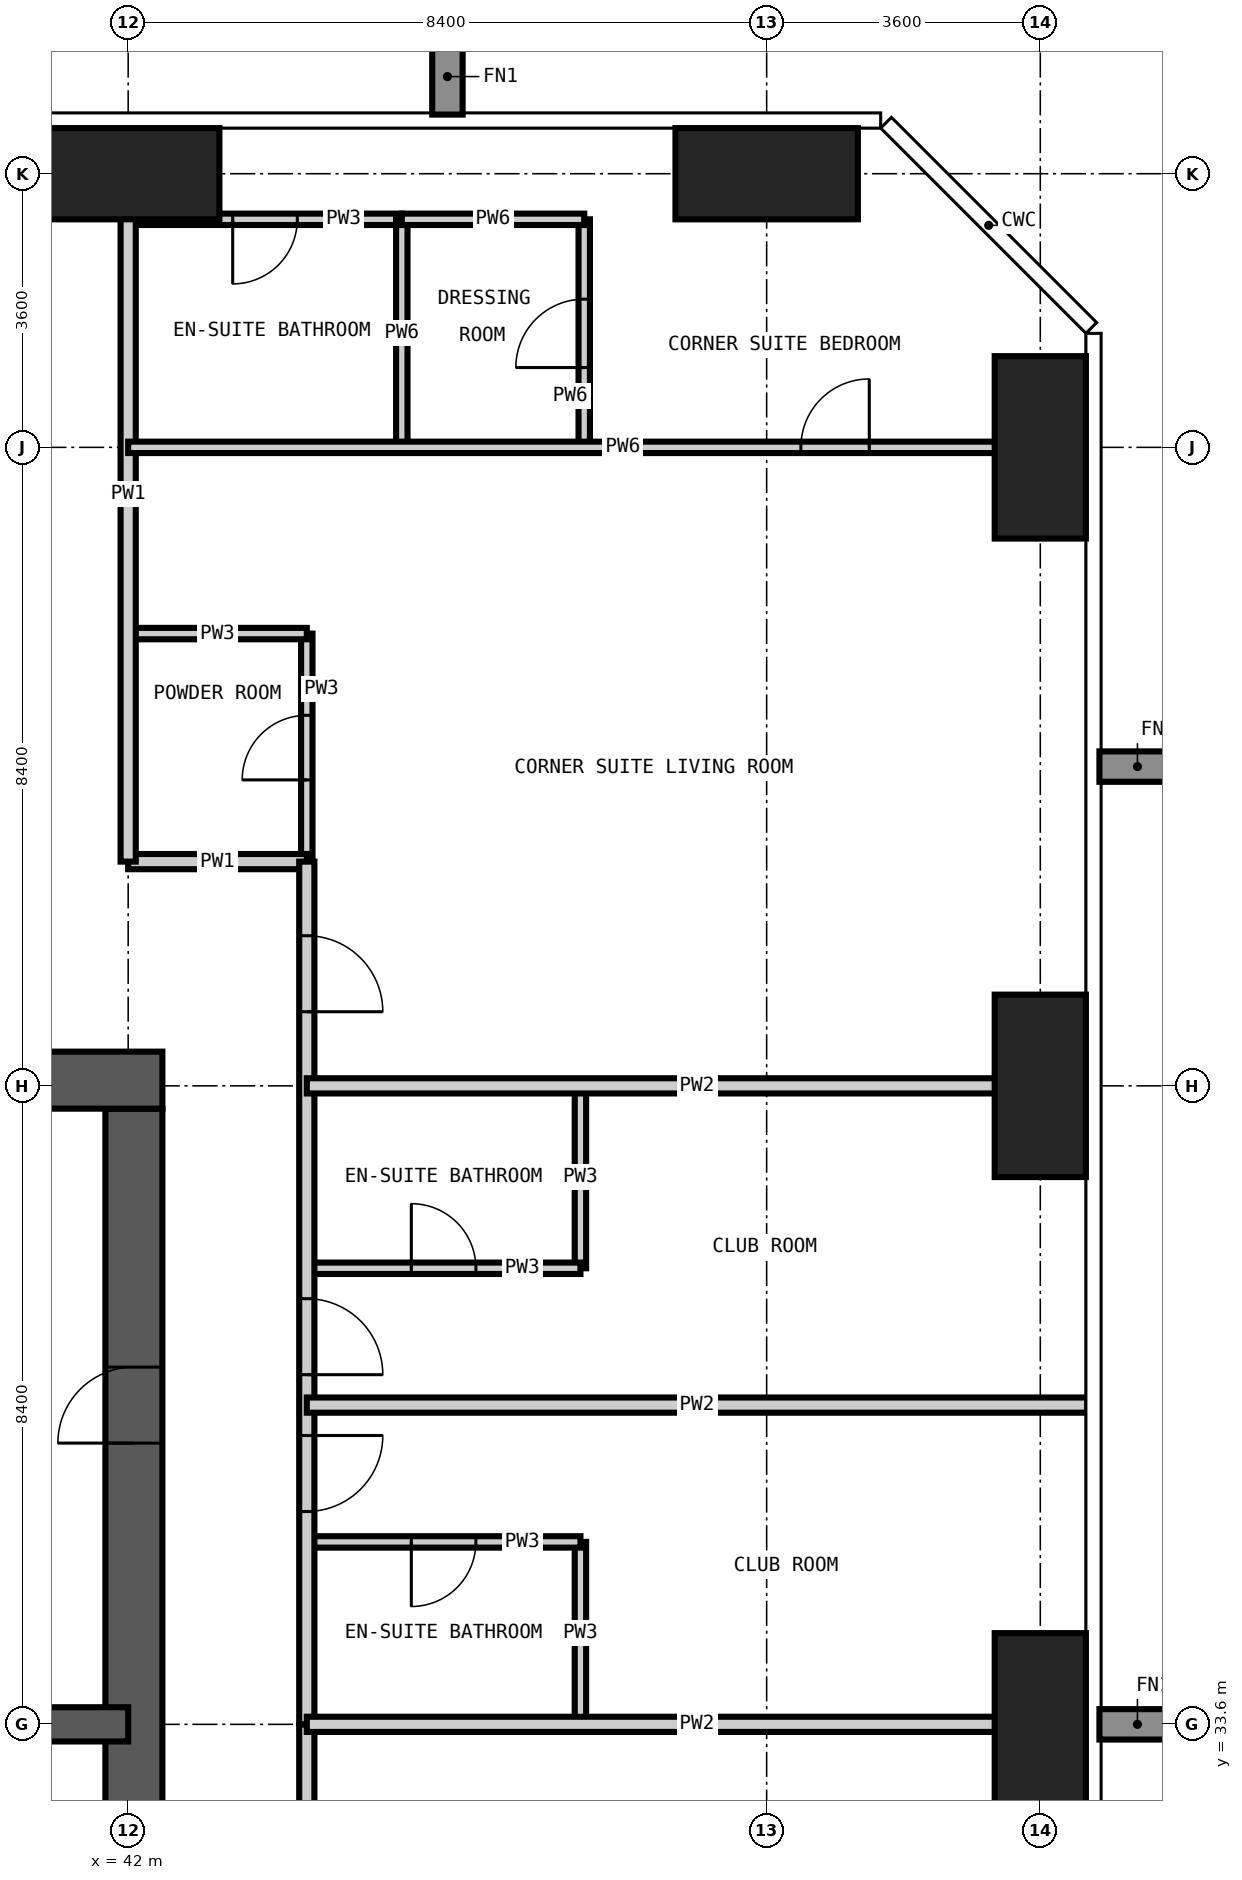
"""IFC4 building model, lengths in metres.
Left out: names, types, materials, properties, quantities, classifications, styles, units other than length and angle.
Written with IfcOpenShell. Run it as: python <this file> out.ifc"""

import sys

from ifc_helpers import new_model, si_unit, direction, frame, frame_2d, origin, origin_2d, place, context, subcontext, project, spatial, rectangle, extrude, element, fill, save


model = new_model("IFC4")
c1 = context("Model", 3, precision=1e-05, world=origin(), true_north=direction((0.0, 1.0)))
c2 = subcontext(c1, "Body", "Model", "MODEL_VIEW")
j1 = project(units=[si_unit("LENGTHUNIT", "METRE"), si_unit("PLANEANGLEUNIT", "RADIAN")], contexts=[c1])
p1 = place(None, origin())
s1 = spatial("IfcSite", under=j1, at=p1, CompositionType="ELEMENT")
p2 = place(p1, origin())
s2 = spatial("IfcBuilding", under=s1, at=p2, CompositionType="ELEMENT")
p3 = place(p2, frame((0.0, 0.0, 166.2)))
s3 = spatial("IfcBuildingStorey", under=s2, at=p3, CompositionType="ELEMENT", Elevation=166.2)
for number, where, z_axis, x_axis in (
    (1, (42.0, 54.0, -0.35), (0.0, 0.0, 1.0), (1.0, 0.0, 0.0)),
    (2, (50.4, 54.0, -0.35), (0.0, 0.0, 1.0), (1.0, 0.0, 0.0)),
):
    element("IfcColumn", number, at=place(p3, frame(where, z_axis=z_axis, x_axis=x_axis)), inside=s3, PredefinedType="COLUMN", context=c2, shape_type="SweptSolid", body=[
        extrude(rectangle(XDim=2.4, YDim=1.2, at=origin_2d()), origin(), (0.0, 0.0, 1.0), 3.6),
    ])
for number, where, z_axis, x_axis in (
    (3, (54.0, 33.6, -0.35), (0.0, 0.0, 1.0), (1.0, 0.0, 0.0)),
    (4, (54.0, 42.0, -0.35), (0.0, 0.0, 1.0), (1.0, 0.0, 0.0)),
    (5, (54.0, 50.4, -0.35), (0.0, 0.0, 1.0), (1.0, 0.0, 0.0)),
):
    element("IfcColumn", number, at=place(p3, frame(where, z_axis=z_axis, x_axis=x_axis)), inside=s3, PredefinedType="COLUMN", context=c2, shape_type="SweptSolid", body=[
        extrude(rectangle(XDim=1.2, YDim=2.4, at=origin_2d()), origin(), (0.0, 0.0, 1.0), 3.6),
    ])
p4 = place(p3, frame((42.075, 17.1, -0.35), z_axis=(0.0, 0.0, 1.0), x_axis=(0.0, 1.0, 0.0)))
e6 = element("IfcWall", 6, at=p4, inside=s3, PredefinedType="SHEAR", context=c2, shape_type="SweptSolid", body=[
    extrude(rectangle(XDim=24.6, YDim=0.75, at=frame_2d((12.3, 0.0))), origin(), (0.0, 0.0, 1.0), 3.6),
])
p5 = place(p4, frame((0.5, 0.0, 0.35)))
e7 = element("IfcOpeningElement", 7, at=p5, cuts=e6, PredefinedType="OPENING", context=c2, shape_type="SweptSolid", body=[
    extrude(rectangle(XDim=1.2, YDim=2.2, at=frame_2d((0.6, 1.1))), frame((0.0, 0.385, 0.0), z_axis=(0.0, -1.0, 0.0), x_axis=(1.0, 0.0, 0.0)), (0.0, 0.0, 1.0), 0.77),
])
p6 = place(p4, frame((11.8, 0.0, 0.35)))
e8 = element("IfcOpeningElement", 8, at=p6, cuts=e6, PredefinedType="OPENING", context=c2, shape_type="SweptSolid", body=[
    extrude(rectangle(XDim=1.0, YDim=2.1, at=frame_2d((0.5, 1.05))), frame((0.0, 0.385, 0.0), z_axis=(0.0, -1.0, 0.0), x_axis=(1.0, 0.0, 0.0)), (0.0, 0.0, 1.0), 0.77),
])
p7 = place(p4, frame((20.2, 0.0, 0.35)))
e9 = element("IfcOpeningElement", 9, at=p7, cuts=e6, PredefinedType="OPENING", context=c2, shape_type="SweptSolid", body=[
    extrude(rectangle(XDim=1.0, YDim=2.1, at=frame_2d((0.5, 1.05))), frame((0.0, 0.385, 0.0), z_axis=(0.0, -1.0, 0.0), x_axis=(1.0, 0.0, 0.0)), (0.0, 0.0, 1.0), 0.77),
])
p8 = place(p3, frame((42.45, 42.075, -0.35), z_axis=(0.0, 0.0, 1.0), x_axis=(-1.0, 0.0, 0.0)))
e10 = element("IfcWall", 10, at=p8, inside=s3, PredefinedType="SHEAR", context=c2, shape_type="SweptSolid", body=[
    extrude(rectangle(XDim=26.1, YDim=0.75, at=frame_2d((13.05, 0.0))), origin(), (0.0, 0.0, 1.0), 3.6),
])
p9 = place(p8, frame((20.95, 0.0, 0.35)))
e11 = element("IfcOpeningElement", 11, at=p9, cuts=e10, PredefinedType="OPENING", context=c2, shape_type="SweptSolid", body=[
    extrude(rectangle(XDim=1.0, YDim=2.1, at=frame_2d((0.5, 1.05))), frame((0.0, 0.385, 0.0), z_axis=(0.0, -1.0, 0.0), x_axis=(1.0, 0.0, 0.0)), (0.0, 0.0, 1.0), 0.77),
])
p10 = place(p8, frame((10.35, 0.0, 0.35)))
e12 = element("IfcOpeningElement", 12, at=p10, cuts=e10, PredefinedType="OPENING", context=c2, shape_type="SweptSolid", body=[
    extrude(rectangle(XDim=1.2, YDim=2.2, at=frame_2d((0.6, 1.1))), frame((0.0, 0.385, 0.0), z_axis=(0.0, -1.0, 0.0), x_axis=(1.0, 0.0, 0.0)), (0.0, 0.0, 1.0), 0.77),
])
p11 = place(p3, frame((16.8, 33.6, -0.35), z_axis=(0.0, 0.0, 1.0), x_axis=(1.0, 0.0, 0.0)))
e13 = element("IfcWall", 13, at=p11, inside=s3, PredefinedType="SHEAR", context=c2, shape_type="SweptSolid", body=[
    extrude(rectangle(XDim=25.2, YDim=0.45, at=frame_2d((12.6, 0.0))), origin(), (0.0, 0.0, 1.0), 3.6),
])
p12 = place(p3, frame((44.35, 44.95, 0.0), z_axis=(0.0, 0.0, 1.0), x_axis=(0.0, 1.0, 0.0)))
e14 = element("IfcWall", 14, at=p12, inside=s3, PredefinedType="PARTITIONING", context=c2, shape_type="SweptSolid", body=[
    extrude(rectangle(XDim=3.0, YDim=0.15, at=frame_2d((1.5, 0.0))), origin(), (0.0, 0.0, 1.0), 3.25),
])
p13 = place(p12, frame((1.075, 0.0, 0.0)))
e15 = element("IfcOpeningElement", 15, at=p13, cuts=e14, PredefinedType="OPENING", context=c2, shape_type="SweptSolid", body=[
    extrude(rectangle(XDim=0.85, YDim=2.1, at=frame_2d((0.425, 1.05))), frame((0.0, 0.085, 0.0), z_axis=(0.0, -1.0, 0.0), x_axis=(1.0, 0.0, 0.0)), (0.0, 0.0, 1.0), 0.17),
])
for number, where, z_axis, x_axis in (
    (16, (47.95, 33.6, 0.0), (0.0, 0.0, 1.0), (0.0, 1.0, 0.0)),
    (17, (47.95, 39.6, 0.0), (0.0, 0.0, 1.0), (0.0, 1.0, 0.0)),
):
    element("IfcWall", number, at=place(p3, frame(where, z_axis=z_axis, x_axis=x_axis)), inside=s3, PredefinedType="PARTITIONING", context=c2, shape_type="SweptSolid", body=[
        extrude(rectangle(XDim=2.4, YDim=0.15, at=frame_2d((1.2, 0.0))), origin(), (0.0, 0.0, 1.0), 3.25),
    ])
p14 = place(p3, frame((44.35, 36.0, 0.0), z_axis=(0.0, 0.0, 1.0), x_axis=(1.0, 0.0, 0.0)))
e18 = element("IfcWall", 18, at=p14, inside=s3, PredefinedType="PARTITIONING", context=c2, shape_type="SweptSolid", body=[
    extrude(rectangle(XDim=3.6, YDim=0.15, at=frame_2d((1.8, 0.0))), origin(), (0.0, 0.0, 1.0), 3.25),
])
p15 = place(p14, frame((1.375, 0.0, 0.0)))
e19 = element("IfcOpeningElement", 19, at=p15, cuts=e18, PredefinedType="OPENING", context=c2, shape_type="SweptSolid", body=[
    extrude(rectangle(XDim=0.85, YDim=2.1, at=frame_2d((0.425, 1.05))), frame((0.0, 0.085, 0.0), z_axis=(0.0, -1.0, 0.0), x_axis=(1.0, 0.0, 0.0)), (0.0, 0.0, 1.0), 0.17),
])
p16 = place(p3, frame((44.35, 39.6, 0.0), z_axis=(0.0, 0.0, 1.0), x_axis=(1.0, 0.0, 0.0)))
e20 = element("IfcWall", 20, at=p16, inside=s3, PredefinedType="PARTITIONING", context=c2, shape_type="SweptSolid", body=[
    extrude(rectangle(XDim=3.6, YDim=0.15, at=frame_2d((1.8, 0.0))), origin(), (0.0, 0.0, 1.0), 3.25),
])
p17 = place(p16, frame((1.375, 0.0, 0.0)))
e21 = element("IfcOpeningElement", 21, at=p17, cuts=e20, PredefinedType="OPENING", context=c2, shape_type="SweptSolid", body=[
    extrude(rectangle(XDim=0.85, YDim=2.1, at=frame_2d((0.425, 1.05))), frame((0.0, 0.085, 0.0), z_axis=(0.0, -1.0, 0.0), x_axis=(1.0, 0.0, 0.0)), (0.0, 0.0, 1.0), 0.17),
])
p18 = place(p3, frame((42.0, 47.95, 0.0), z_axis=(0.0, 0.0, 1.0), x_axis=(1.0, 0.0, 0.0)))
e22 = element("IfcWall", 22, at=p18, inside=s3, PredefinedType="PARTITIONING", context=c2, shape_type="SweptSolid", body=[
    extrude(rectangle(XDim=2.35, YDim=0.15, at=frame_2d((1.175, 0.0))), origin(), (0.0, 0.0, 1.0), 3.25),
])
p19 = place(p3, frame((42.0, 53.4, 0.0), z_axis=(0.0, 0.0, 1.0), x_axis=(1.0, 0.0, 0.0)))
e23 = element("IfcWall", 23, at=p19, inside=s3, PredefinedType="PARTITIONING", context=c2, shape_type="SweptSolid", body=[
    extrude(rectangle(XDim=3.6, YDim=0.15, at=frame_2d((1.8, 0.0))), origin(), (0.0, 0.0, 1.0), 3.25),
])
p20 = place(p19, frame((1.375, 0.0, 0.0)))
e24 = element("IfcOpeningElement", 24, at=p20, cuts=e23, PredefinedType="OPENING", context=c2, shape_type="SweptSolid", body=[
    extrude(rectangle(XDim=0.85, YDim=2.1, at=frame_2d((0.425, 1.05))), frame((0.0, 0.085, 0.0), z_axis=(0.0, -1.0, 0.0), x_axis=(1.0, 0.0, 0.0)), (0.0, 0.0, 1.0), 0.17),
])
p21 = place(p3, frame((44.35, 25.2, 0.0), z_axis=(0.0, 0.0, 1.0), x_axis=(0.0, 1.0, 0.0)))
e25 = element("IfcWall", 25, at=p21, inside=s3, PredefinedType="PARTITIONING", context=c2, shape_type="SweptSolid", body=[
    extrude(rectangle(XDim=8.4, YDim=0.2, at=frame_2d((4.2, 0.0))), origin(), (0.0, 0.0, 1.0), 3.25),
])
p22 = place(p21, frame((3.3, 0.0, 0.0)))
e26 = element("IfcOpeningElement", 26, at=p22, cuts=e25, PredefinedType="OPENING", context=c2, shape_type="SweptSolid", body=[
    extrude(rectangle(XDim=1.8, YDim=2.4, at=frame_2d((0.9, 1.2))), frame((0.0, 0.11, 0.0), z_axis=(0.0, -1.0, 0.0), x_axis=(1.0, 0.0, 0.0)), (0.0, 0.0, 1.0), 0.22),
])
p23 = place(p3, frame((42.0, 44.95, 0.0), z_axis=(0.0, 0.0, 1.0), x_axis=(1.0, 0.0, 0.0)))
e27 = element("IfcWall", 27, at=p23, inside=s3, PredefinedType="PARTITIONING", context=c2, shape_type="SweptSolid", body=[
    extrude(rectangle(XDim=2.35, YDim=0.2, at=frame_2d((1.175, 0.0))), origin(), (0.0, 0.0, 1.0), 3.25),
])
p24 = place(p3, frame((42.0, 54.618, 0.0), z_axis=(0.0, 0.0, 1.0), x_axis=(0.0, -1.0, 0.0)))
e28 = element("IfcWall", 28, at=p24, inside=s3, PredefinedType="PARTITIONING", context=c2, shape_type="SweptSolid", body=[
    extrude(rectangle(XDim=9.668, YDim=0.2, at=frame_2d((4.834, 0.0))), origin(), (0.0, 0.0, 1.0), 3.25),
])
p25 = place(p3, frame((44.35, 44.95, 0.0), z_axis=(0.0, 0.0, 1.0), x_axis=(0.0, -1.0, 0.0)))
e29 = element("IfcWall", 29, at=p25, inside=s3, PredefinedType="PARTITIONING", context=c2, shape_type="SweptSolid", body=[
    extrude(rectangle(XDim=11.35, YDim=0.2, at=frame_2d((5.675, 0.0))), origin(), (0.0, 0.0, 1.0), 3.25),
])
p26 = place(p25, frame((7.55, 0.0, 0.0)))
e30 = element("IfcOpeningElement", 30, at=p26, cuts=e29, PredefinedType="OPENING", context=c2, shape_type="SweptSolid", body=[
    extrude(rectangle(XDim=1.0, YDim=2.2, at=frame_2d((0.5, 1.1))), frame((0.0, 0.11, 0.0), z_axis=(0.0, -1.0, 0.0), x_axis=(1.0, 0.0, 0.0)), (0.0, 0.0, 1.0), 0.22),
])
p27 = place(p25, frame((5.75, 0.0, 0.0)))
e31 = element("IfcOpeningElement", 31, at=p27, cuts=e29, PredefinedType="OPENING", context=c2, shape_type="SweptSolid", body=[
    extrude(rectangle(XDim=1.0, YDim=2.2, at=frame_2d((0.5, 1.1))), frame((0.0, 0.11, 0.0), z_axis=(0.0, -1.0, 0.0), x_axis=(1.0, 0.0, 0.0)), (0.0, 0.0, 1.0), 0.22),
])
p28 = place(p25, frame((0.975, 0.0, 0.0)))
e32 = element("IfcOpeningElement", 32, at=p28, cuts=e29, PredefinedType="OPENING", context=c2, shape_type="SweptSolid", body=[
    extrude(rectangle(XDim=1.0, YDim=2.2, at=frame_2d((0.5, 1.1))), frame((0.0, 0.11, 0.0), z_axis=(0.0, -1.0, 0.0), x_axis=(1.0, 0.0, 0.0)), (0.0, 0.0, 1.0), 0.22),
])
for number, where, z_axis, x_axis in (
    (33, (44.35, 33.6, 0.0), (0.0, 0.0, 1.0), (1.0, 0.0, 0.0)),
    (34, (44.35, 37.8, 0.0), (0.0, 0.0, 1.0), (1.0, 0.0, 0.0)),
    (35, (44.35, 42.0, 0.0), (0.0, 0.0, 1.0), (1.0, 0.0, 0.0)),
):
    element("IfcWall", number, at=place(p3, frame(where, z_axis=z_axis, x_axis=x_axis)), inside=s3, PredefinedType="PARTITIONING", context=c2, shape_type="SweptSolid", body=[
        extrude(rectangle(XDim=10.268, YDim=0.2, at=frame_2d((5.134, 0.0))), origin(), (0.0, 0.0, 1.0), 3.25),
    ])
p29 = place(p3, frame((45.6, 50.4, 0.0), z_axis=(0.0, 0.0, 1.0), x_axis=(0.0, 1.0, 0.0)))
e36 = element("IfcWall", 36, at=p29, inside=s3, PredefinedType="PARTITIONING", context=c2, shape_type="SweptSolid", body=[
    extrude(rectangle(XDim=3.0, YDim=0.15, at=frame_2d((1.5, 0.0))), origin(), (0.0, 0.0, 1.0), 3.25),
])
p30 = place(p3, frame((48.0, 50.4, 0.0), z_axis=(0.0, 0.0, 1.0), x_axis=(0.0, 1.0, 0.0)))
e37 = element("IfcWall", 37, at=p30, inside=s3, PredefinedType="PARTITIONING", context=c2, shape_type="SweptSolid", body=[
    extrude(rectangle(XDim=3.0, YDim=0.15, at=frame_2d((1.5, 0.0))), origin(), (0.0, 0.0, 1.0), 3.25),
])
p31 = place(p30, frame((1.05, 0.0, 0.0)))
e38 = element("IfcOpeningElement", 38, at=p31, cuts=e37, PredefinedType="OPENING", context=c2, shape_type="SweptSolid", body=[
    extrude(rectangle(XDim=0.9, YDim=2.1, at=frame_2d((0.45, 1.05))), frame((0.0, 0.085, 0.0), z_axis=(0.0, -1.0, 0.0), x_axis=(1.0, 0.0, 0.0)), (0.0, 0.0, 1.0), 0.17),
])
p32 = place(p3, frame((42.0, 50.4, 0.0), z_axis=(0.0, 0.0, 1.0), x_axis=(1.0, 0.0, 0.0)))
e39 = element("IfcWall", 39, at=p32, inside=s3, PredefinedType="PARTITIONING", context=c2, shape_type="SweptSolid", body=[
    extrude(rectangle(XDim=12.618, YDim=0.15, at=frame_2d((6.309, 0.0))), origin(), (0.0, 0.0, 1.0), 3.25),
])
p33 = place(p32, frame((8.85, 0.0, 0.0)))
e40 = element("IfcOpeningElement", 40, at=p33, cuts=e39, PredefinedType="OPENING", context=c2, shape_type="SweptSolid", body=[
    extrude(rectangle(XDim=0.9, YDim=2.1, at=frame_2d((0.45, 1.05))), frame((0.0, 0.085, 0.0), z_axis=(0.0, -1.0, 0.0), x_axis=(1.0, 0.0, 0.0)), (0.0, 0.0, 1.0), 0.17),
])
p34 = place(p3, frame((45.6, 53.4, 0.0), z_axis=(0.0, 0.0, 1.0), x_axis=(1.0, 0.0, 0.0)))
e41 = element("IfcWall", 41, at=p34, inside=s3, PredefinedType="PARTITIONING", context=c2, shape_type="SweptSolid", body=[
    extrude(rectangle(XDim=2.4, YDim=0.15, at=frame_2d((1.2, 0.0))), origin(), (0.0, 0.0, 1.0), 3.25),
])
p35 = place(p26, origin())
e42 = element("IfcDoor", 42, at=p35, inside=s3, OperationType="SINGLE_SWING_LEFT", PredefinedType="DOOR", context=c2, shape_type="SweptSolid", body=[
    extrude(rectangle(XDim=1.0, YDim=2.2, at=frame_2d((0.5, 1.1))), frame((0.0, 0.025, 0.0), z_axis=(0.0, -1.0, 0.0), x_axis=(1.0, 0.0, 0.0)), (0.0, 0.0, 1.0), 0.05),
])
fill(e30, e42)
p36 = place(p15, frame((0.85, 0.0, 0.0), z_axis=(0.0, 0.0, 1.0), x_axis=(-1.0, 0.0, 0.0)))
e43 = element("IfcDoor", 43, at=p36, inside=s3, OperationType="SINGLE_SWING_RIGHT", PredefinedType="DOOR", context=c2, shape_type="SweptSolid", body=[
    extrude(rectangle(XDim=0.85, YDim=2.1, at=frame_2d((0.425, 1.05))), frame((0.0, 0.025, 0.0), z_axis=(0.0, -1.0, 0.0), x_axis=(1.0, 0.0, 0.0)), (0.0, 0.0, 1.0), 0.05),
])
fill(e19, e43)
p37 = place(p27, origin())
e44 = element("IfcDoor", 44, at=p37, inside=s3, OperationType="SINGLE_SWING_RIGHT", PredefinedType="DOOR", context=c2, shape_type="SweptSolid", body=[
    extrude(rectangle(XDim=1.0, YDim=2.2, at=frame_2d((0.5, 1.1))), frame((0.0, 0.025, 0.0), z_axis=(0.0, -1.0, 0.0), x_axis=(1.0, 0.0, 0.0)), (0.0, 0.0, 1.0), 0.05),
])
fill(e31, e44)
p38 = place(p17, origin())
e45 = element("IfcDoor", 45, at=p38, inside=s3, OperationType="SINGLE_SWING_LEFT", PredefinedType="DOOR", context=c2, shape_type="SweptSolid", body=[
    extrude(rectangle(XDim=0.85, YDim=2.1, at=frame_2d((0.425, 1.05))), frame((0.0, 0.025, 0.0), z_axis=(0.0, -1.0, 0.0), x_axis=(1.0, 0.0, 0.0)), (0.0, 0.0, 1.0), 0.05),
])
fill(e21, e45)
p39 = place(p28, origin())
e46 = element("IfcDoor", 46, at=p39, inside=s3, OperationType="SINGLE_SWING_RIGHT", PredefinedType="DOOR", context=c2, shape_type="SweptSolid", body=[
    extrude(rectangle(XDim=1.0, YDim=2.2, at=frame_2d((0.5, 1.1))), frame((0.0, 0.025, 0.0), z_axis=(0.0, -1.0, 0.0), x_axis=(1.0, 0.0, 0.0)), (0.0, 0.0, 1.0), 0.05),
])
fill(e32, e46)
p40 = place(p13, origin())
e47 = element("IfcDoor", 47, at=p40, inside=s3, OperationType="SINGLE_SWING_LEFT", PredefinedType="DOOR", context=c2, shape_type="SweptSolid", body=[
    extrude(rectangle(XDim=0.85, YDim=2.1, at=frame_2d((0.425, 1.05))), frame((0.0, 0.025, 0.0), z_axis=(0.0, -1.0, 0.0), x_axis=(1.0, 0.0, 0.0)), (0.0, 0.0, 1.0), 0.05),
])
fill(e15, e47)
p41 = place(p33, origin())
e48 = element("IfcDoor", 48, at=p41, inside=s3, OperationType="SINGLE_SWING_RIGHT", PredefinedType="DOOR", context=c2, shape_type="SweptSolid", body=[
    extrude(rectangle(XDim=0.9, YDim=2.1, at=frame_2d((0.45, 1.05))), frame((0.0, 0.025, 0.0), z_axis=(0.0, -1.0, 0.0), x_axis=(1.0, 0.0, 0.0)), (0.0, 0.0, 1.0), 0.05),
])
fill(e40, e48)
p42 = place(p20, frame((0.85, 0.0, 0.0), z_axis=(0.0, 0.0, 1.0), x_axis=(-1.0, 0.0, 0.0)))
e49 = element("IfcDoor", 49, at=p42, inside=s3, OperationType="SINGLE_SWING_RIGHT", PredefinedType="DOOR", context=c2, shape_type="SweptSolid", body=[
    extrude(rectangle(XDim=0.85, YDim=2.1, at=frame_2d((0.425, 1.05))), frame((0.0, 0.025, 0.0), z_axis=(0.0, -1.0, 0.0), x_axis=(1.0, 0.0, 0.0)), (0.0, 0.0, 1.0), 0.05),
])
fill(e24, e49)
p43 = place(p31, origin())
e50 = element("IfcDoor", 50, at=p43, inside=s3, OperationType="SINGLE_SWING_LEFT", PredefinedType="DOOR", context=c2, shape_type="SweptSolid", body=[
    extrude(rectangle(XDim=0.9, YDim=2.1, at=frame_2d((0.45, 1.05))), frame((0.0, 0.025, 0.0), z_axis=(0.0, -1.0, 0.0), x_axis=(1.0, 0.0, 0.0)), (0.0, 0.0, 1.0), 0.05),
])
fill(e38, e50)
p44 = place(p7, origin())
e51 = element("IfcDoor", 51, at=p44, inside=s3, OperationType="SINGLE_SWING_LEFT", PredefinedType="DOOR", context=c2, shape_type="SweptSolid", body=[
    extrude(rectangle(XDim=1.0, YDim=2.1, at=frame_2d((0.5, 1.05))), frame((0.0, 0.025, 0.0), z_axis=(0.0, -1.0, 0.0), x_axis=(1.0, 0.0, 0.0)), (0.0, 0.0, 1.0), 0.05),
])
fill(e9, e51)
save(model, sys.argv[1])
